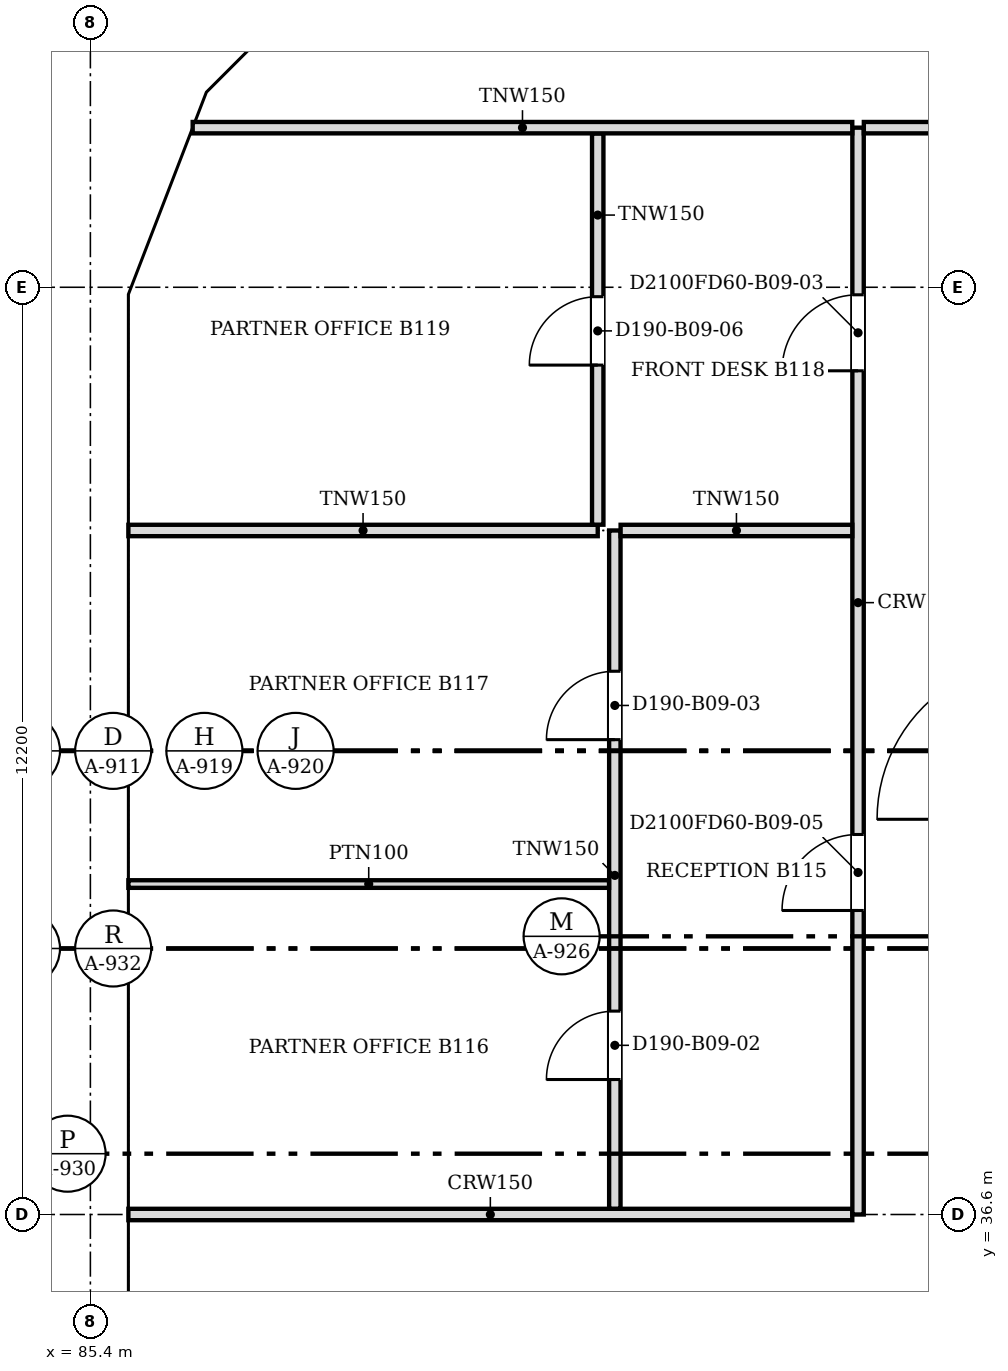
"""IFC4 building model, lengths in metres.
Left out: names, types, materials, properties, quantities, classifications, styles, units other than length and angle.
Written with IfcOpenShell. Run it as: python <this file> out.ifc"""

import sys

from ifc_helpers import new_model, si_unit, direction, frame, frame_2d, origin, place, context, subcontext, project, spatial, polyline, rectangle, outline, extrude, faceted_brep, source, transform, mapped, element, fill, save


model = new_model("IFC4")
c1 = context("Model", 3, precision=1e-05, world=origin(), true_north=direction((0.0, 1.0)))
c2 = subcontext(c1, "Body", "Model", "MODEL_VIEW")
j1 = project(units=[si_unit("LENGTHUNIT", "METRE"), si_unit("PLANEANGLEUNIT", "RADIAN")], contexts=[c1])
p1 = place(None, origin())
s1 = spatial("IfcSite", under=j1, at=p1, CompositionType="ELEMENT")
p2 = place(p1, origin())
s2 = spatial("IfcBuilding", under=s1, at=p2, CompositionType="ELEMENT")
p3 = place(p2, frame((0.0, 0.0, 91.4)))
s3 = spatial("IfcBuildingStorey", under=s2, at=p3, CompositionType="ELEMENT", Elevation=91.4)
m1 = source(origin(), c2, "Body", "Brep", [
    faceted_brep([(2.944, -0.25, 0.0), (2.997, -0.25, 0.068), (2.997, -0.25, 7.532), (2.944, -0.25, 7.6), (0.0, -0.25, 3.8), (0.053, 0.25, 3.868), (2.891, 0.25, 7.532), (2.891, 0.25, 0.068), (0.053, 0.25, 3.731), (2.944, 0.0, 0.0), (2.944, 0.0, 7.6), (0.0, 0.0, 3.8)], [[[0, 1, 2, 3, 4]], [[5, 6, 7, 8]], [[1, 0, 9]], [[10, 3, 2]], [[6, 5, 11, 4, 3, 10]], [[8, 7, 9, 0, 4, 11]], [[8, 11, 5]], [[1, 9, 7, 6, 10, 2]]]),
])
p4 = place(p3, frame((88.794, 53.588, -3.8), z_axis=(0.0, 0.0, 1.0), x_axis=(-0.707066050402, -0.707147509625, 0.0)))
e1 = element("IfcWall", 1, at=p4, inside=s3, PredefinedType="SOLIDWALL", context=c2, shape_type="MappedRepresentation", body=[
    mapped(m1, transform((0.0, 0.0, 0.0), scale=1.0)),
])
m2 = source(origin(), c2, "Body", "SweptSolid", [
    extrude(outline(polyline([(2.744, 6.934), (0.316, 3.8), (2.744, 0.666), (2.744, 6.934)])), frame((0.0, 0.26, 0.0), z_axis=(0.0, -1.0, 0.0), x_axis=(1.0, 0.0, 0.0)), (0.0, 0.0, 1.0), 0.52),
])
p5 = place(p4, origin())
e2 = element("IfcOpeningElement", 2, at=p5, cuts=e1, PredefinedType="OPENING", context=c2, shape_type="MappedRepresentation", body=[
    mapped(m2, transform((0.0, 0.0, 0.0), scale=1.0)),
])
m3 = source(origin(), c2, "Body", "Brep", [
    faceted_brep([(0.053, -0.25, 0.0), (3.003, -0.25, 3.8), (0.053, -0.25, 7.6), (0.0, -0.25, 7.531), (0.0, -0.25, 0.068), (0.106, 0.25, 7.532), (2.957, 0.25, 3.86), (2.957, 0.25, 3.74), (0.106, 0.25, 0.068), (3.003, 0.0, 3.8), (0.053, 0.0, 0.0), (0.053, 0.0, 7.6)], [[[0, 1, 2, 3, 4]], [[5, 6, 7, 8]], [[8, 7, 9, 1, 0, 10]], [[6, 5, 11, 2, 1, 9]], [[3, 2, 11]], [[10, 0, 4]], [[8, 10, 4, 3, 11, 5]], [[9, 7, 6]]]),
])
p6 = place(p3, frame((86.731, 51.556, -3.8), z_axis=(0.0, 0.0, 1.0), x_axis=(-0.359855894603, -0.933007896601, 0.0)))
e3 = element("IfcWall", 3, at=p6, inside=s3, PredefinedType="SOLIDWALL", context=c2, shape_type="MappedRepresentation", body=[
    mapped(m3, transform((0.0, 0.0, 0.0), scale=1.0)),
])
m4 = source(origin(), c2, "Body", "SweptSolid", [
    extrude(outline(polyline([(0.253, 0.665), (2.687, 3.8), (0.253, 6.935), (0.253, 0.665)])), frame((0.0, 0.26, 0.0), z_axis=(0.0, -1.0, 0.0), x_axis=(1.0, 0.0, 0.0)), (0.0, 0.0, 1.0), 0.52),
])
p7 = place(p6, origin())
e4 = element("IfcOpeningElement", 4, at=p7, cuts=e3, PredefinedType="OPENING", context=c2, shape_type="MappedRepresentation", body=[
    mapped(m4, transform((0.0, 0.0, 0.0), scale=1.0)),
])
m5 = source(origin(), c2, "Body", "Brep", [
    faceted_brep([(3.003, -0.25, 0.0), (6.053, -0.25, 3.8), (3.003, -0.25, 7.6), (0.0, -0.25, 3.8), (0.047, 0.25, 3.859), (3.003, 0.25, 7.6), (6.053, 0.25, 3.8), (3.003, 0.25, 0.0), (0.047, 0.25, 3.741), (0.0, 0.0, 3.8)], [[[0, 1, 2, 3]], [[4, 5, 6, 7, 8]], [[7, 6, 1, 0]], [[6, 5, 2, 1]], [[5, 4, 9, 3, 2]], [[8, 7, 0, 3, 9]], [[8, 9, 4]]]),
])
p8 = place(p3, frame((85.65, 48.753, -3.8), z_axis=(0.0, 0.0, 1.0), x_axis=(0.0, -1.0, 0.0)))
e5 = element("IfcWall", 5, at=p8, inside=s3, PredefinedType="SOLIDWALL", context=c2, shape_type="MappedRepresentation", body=[
    mapped(m5, transform((0.0, 0.0, 0.0), scale=1.0)),
])
m6 = source(origin(), c2, "Body", "SweptSolid", [
    extrude(outline(polyline([(3.005, 0.401), (5.733, 3.8), (3.005, 7.199), (0.319, 3.8), (3.005, 0.401)])), frame((0.0, 0.26, 0.0), z_axis=(0.0, -1.0, 0.0), x_axis=(1.0, 0.0, 0.0)), (0.0, 0.0, 1.0), 0.52),
])
p9 = place(p8, origin())
e6 = element("IfcOpeningElement", 6, at=p9, cuts=e5, PredefinedType="OPENING", context=c2, shape_type="MappedRepresentation", body=[
    mapped(m6, transform((0.0, 0.0, 0.0), scale=1.0)),
])
m7 = source(origin(), c2, "Body", "Brep", [
    faceted_brep([(3.05, -0.25, 0.0), (6.1, -0.25, 3.8), (6.1, -0.25, 3.8), (3.05, -0.25, 7.6), (0.0, -0.25, 3.8), (0.0, 0.25, 3.8), (3.05, 0.25, 7.6), (6.1, 0.25, 3.8), (6.1, 0.25, 3.8), (3.05, 0.25, 0.0)], [[[0, 1, 2, 3, 4]], [[5, 6, 7, 8, 9]], [[9, 8, 1, 0]], [[7, 6, 3, 2]], [[6, 5, 4, 3]], [[5, 9, 0, 4]], [[1, 8, 7, 2]]]),
])
p10 = place(p3, frame((85.65, 42.7, -3.8), z_axis=(0.0, 0.0, 1.0), x_axis=(0.0, -1.0, 0.0)))
e7 = element("IfcWall", 7, at=p10, inside=s3, PredefinedType="SOLIDWALL", context=c2, shape_type="MappedRepresentation", body=[
    mapped(m7, transform((0.0, 0.0, 0.0), scale=1.0)),
])
m8 = source(origin(), c2, "Body", "SweptSolid", [
    extrude(outline(polyline([(3.05, 0.399), (5.78, 3.8), (3.05, 7.2), (0.321, 3.8), (3.05, 0.399)])), frame((0.0, 0.26, 0.0), z_axis=(0.0, -1.0, 0.0), x_axis=(1.0, 0.0, 0.0)), (0.0, 0.0, 1.0), 0.52),
])
p11 = place(p10, origin())
e8 = element("IfcOpeningElement", 8, at=p11, cuts=e7, PredefinedType="OPENING", context=c2, shape_type="MappedRepresentation", body=[
    mapped(m8, transform((0.0, 0.0, 0.0), scale=1.0)),
])
m9 = source(origin(), c2, "Body", "SweptSolid", [
    extrude(outline(polyline([(3.05, 0.0), (6.1, 3.8), (3.05, 7.6), (0.0, 3.8), (3.05, 0.0)])), frame((0.0, 0.25, 0.0), z_axis=(0.0, -1.0, 0.0), x_axis=(1.0, 0.0, 0.0)), (0.0, 0.0, 1.0), 0.5),
])
p12 = place(p3, frame((85.65, 36.6, -3.8), z_axis=(0.0, 0.0, 1.0), x_axis=(0.0, -1.0, 0.0)))
e9 = element("IfcWall", 9, at=p12, inside=s3, PredefinedType="SOLIDWALL", context=c2, shape_type="MappedRepresentation", body=[
    mapped(m9, transform((0.0, 0.0, 0.0), scale=1.0)),
])
p13 = place(p12, origin())
e10 = element("IfcOpeningElement", 10, at=p13, cuts=e9, PredefinedType="OPENING", context=c2, shape_type="MappedRepresentation", body=[
    mapped(m8, transform((0.0, 0.0, 0.0), scale=1.0)),
])
m10 = source(origin(), c2, "Body", "Brep", [
    faceted_brep([(0.053, -0.25, 0.0), (2.997, -0.25, 3.8), (0.0, -0.25, 3.8), (0.0, -0.25, 0.068), (0.106, 0.25, 3.8), (2.944, 0.25, 3.8), (2.944, 0.25, 3.732), (0.106, 0.25, 0.068), (2.997, 0.0, 3.8), (0.053, 0.0, 0.0)], [[[0, 1, 2, 3]], [[4, 5, 6, 7]], [[7, 6, 8, 1, 0, 9]], [[5, 4, 2, 1, 8]], [[9, 0, 3]], [[7, 9, 3, 2, 4]], [[6, 5, 8]]]),
])
p14 = place(p3, frame((88.831, 53.625, 0.0), z_axis=(0.0, 0.0, 1.0), x_axis=(-0.707147509625, -0.707066050402, 0.0)))
e11 = element("IfcWall", 11, at=p14, inside=s3, PredefinedType="SOLIDWALL", context=c2, shape_type="MappedRepresentation", body=[
    mapped(m10, transform((0.0, 0.0, 0.0), scale=1.0)),
])
m11 = source(origin(), c2, "Body", "SweptSolid", [
    extrude(outline(polyline([(0.253, 0.667), (2.487, 3.55), (0.253, 3.55), (0.253, 0.667)])), frame((0.0, 0.26, 0.0), z_axis=(0.0, -1.0, 0.0), x_axis=(1.0, 0.0, 0.0)), (0.0, 0.0, 1.0), 0.52),
])
p15 = place(p14, origin())
e12 = element("IfcOpeningElement", 12, at=p15, cuts=e11, PredefinedType="OPENING", context=c2, shape_type="MappedRepresentation", body=[
    mapped(m11, transform((0.0, 0.0, 0.0), scale=1.0)),
])
m12 = source(origin(), c2, "Body", "Brep", [
    faceted_brep([(2.95, -0.25, 0.0), (2.997, -0.25, 0.059), (2.997, -0.25, 3.8), (0.0, -0.25, 3.8), (0.053, 0.25, 3.8), (2.904, 0.25, 3.8), (2.904, 0.25, 0.06), (0.053, 0.25, 3.732), (2.95, 0.0, 0.0), (0.0, 0.0, 3.8)], [[[0, 1, 2, 3]], [[4, 5, 6, 7]], [[1, 0, 8]], [[5, 4, 9, 3, 2]], [[7, 6, 8, 0, 3, 9]], [[7, 9, 4]], [[1, 8, 6, 5, 2]]]),
])
p16 = place(p3, frame((86.712, 51.506, 0.0), z_axis=(0.0, 0.0, 1.0), x_axis=(-0.359874094142, -0.933000876937, 0.0)))
e13 = element("IfcWall", 13, at=p16, inside=s3, PredefinedType="SOLIDWALL", context=c2, shape_type="MappedRepresentation", body=[
    mapped(m12, transform((0.0, 0.0, 0.0), scale=1.0)),
])
m13 = source(origin(), c2, "Body", "SweptSolid", [
    extrude(outline(polyline([(2.75, 3.55), (0.511, 3.55), (2.75, 0.665), (2.75, 3.55)])), frame((0.0, 0.26, 0.0), z_axis=(0.0, -1.0, 0.0), x_axis=(1.0, 0.0, 0.0)), (0.0, 0.0, 1.0), 0.52),
])
p17 = place(p16, origin())
e14 = element("IfcOpeningElement", 14, at=p17, cuts=e13, PredefinedType="OPENING", context=c2, shape_type="MappedRepresentation", body=[
    mapped(m13, transform((0.0, 0.0, 0.0), scale=1.0)),
])
m14 = source(origin(), c2, "Body", "Brep", [
    faceted_brep([(0.047, -0.25, 0.0), (3.05, -0.25, 3.8), (0.0, -0.25, 3.8), (0.0, -0.25, 0.06), (0.093, 0.25, 3.8), (3.05, 0.25, 3.8), (0.093, 0.25, 0.059), (0.047, 0.0, 0.0)], [[[0, 1, 2, 3]], [[4, 5, 6]], [[6, 5, 1, 0, 7]], [[5, 4, 2, 1]], [[7, 0, 3]], [[6, 7, 3, 2, 4]]]),
])
p18 = place(p3, frame((85.65, 48.8, 0.0), z_axis=(0.0, 0.0, 1.0), x_axis=(0.0, -1.0, 0.0)))
e15 = element("IfcWall", 15, at=p18, inside=s3, PredefinedType="SOLIDWALL", context=c2, shape_type="MappedRepresentation", body=[
    mapped(m14, transform((0.0, 0.0, 0.0), scale=1.0)),
])
m15 = source(origin(), c2, "Body", "SweptSolid", [
    extrude(outline(polyline([(0.247, 0.656), (2.534, 3.55), (0.247, 3.55), (0.247, 0.656)])), frame((0.0, 0.26, 0.0), z_axis=(0.0, -1.0, 0.0), x_axis=(1.0, 0.0, 0.0)), (0.0, 0.0, 1.0), 0.52),
])
p19 = place(p18, origin())
e16 = element("IfcOpeningElement", 16, at=p19, cuts=e15, PredefinedType="OPENING", context=c2, shape_type="MappedRepresentation", body=[
    mapped(m15, transform((0.0, 0.0, 0.0), scale=1.0)),
])
m16 = source(origin(), c2, "Body", "SweptSolid", [
    extrude(outline(polyline([(3.05, 0.0), (6.1, 3.8), (0.0, 3.8), (3.05, 0.0)])), frame((0.0, 0.25, 0.0), z_axis=(0.0, -1.0, 0.0), x_axis=(1.0, 0.0, 0.0)), (0.0, 0.0, 1.0), 0.5),
])
p20 = place(p3, frame((85.65, 45.75, 0.0), z_axis=(0.0, 0.0, 1.0), x_axis=(0.0, -1.0, 0.0)))
e17 = element("IfcWall", 17, at=p20, inside=s3, PredefinedType="SOLIDWALL", context=c2, shape_type="MappedRepresentation", body=[
    mapped(m16, transform((0.0, 0.0, 0.0), scale=1.0)),
])
m17 = source(origin(), c2, "Body", "SweptSolid", [
    extrude(outline(polyline([(3.05, 0.399), (5.579, 3.55), (0.521, 3.55), (3.05, 0.399)])), frame((0.0, 0.26, 0.0), z_axis=(0.0, -1.0, 0.0), x_axis=(1.0, 0.0, 0.0)), (0.0, 0.0, 1.0), 0.52),
])
p21 = place(p20, origin())
e18 = element("IfcOpeningElement", 18, at=p21, cuts=e17, PredefinedType="OPENING", context=c2, shape_type="MappedRepresentation", body=[
    mapped(m17, transform((0.0, 0.0, 0.0), scale=1.0)),
])
m18 = source(origin(), c2, "Body", "Brep", [
    faceted_brep([(3.05, -0.25, 0.0), (6.1, -0.25, 3.8), (6.1, -0.25, 3.8), (0.0, -0.25, 3.8), (0.0, 0.25, 3.8), (6.1, 0.25, 3.8), (6.1, 0.25, 3.8), (3.05, 0.25, 0.0)], [[[0, 1, 2, 3]], [[4, 5, 6, 7]], [[7, 6, 1, 0]], [[5, 4, 3, 2]], [[4, 7, 0, 3]], [[1, 6, 5, 2]]]),
])
p22 = place(p3, frame((85.65, 39.65, 0.0), z_axis=(0.0, 0.0, 1.0), x_axis=(0.0, -1.0, 0.0)))
e19 = element("IfcWall", 19, at=p22, inside=s3, PredefinedType="SOLIDWALL", context=c2, shape_type="MappedRepresentation", body=[
    mapped(m18, transform((0.0, 0.0, 0.0), scale=1.0)),
])
p23 = place(p22, origin())
e20 = element("IfcOpeningElement", 20, at=p23, cuts=e19, PredefinedType="OPENING", context=c2, shape_type="MappedRepresentation", body=[
    mapped(m17, transform((0.0, 0.0, 0.0), scale=1.0)),
])
p24 = place(p3, frame((85.9, 36.6, 0.0), z_axis=(0.0, 0.0, 1.0), x_axis=(1.0, 0.0, 0.0)))
e21 = element("IfcWall", 21, at=p24, inside=s3, PredefinedType="PARTITIONING", context=c2, shape_type="SweptSolid", body=[
    extrude(rectangle(XDim=9.524, YDim=0.15, at=frame_2d((4.762, 0.0))), origin(), (0.0, 0.0, 1.0), 2.895),
])
p25 = place(p3, frame((95.5, 36.6, 0.0), z_axis=(0.0, 0.0, 1.0), x_axis=(0.0, 1.0, 0.0)))
e22 = element("IfcWall", 22, at=p25, inside=s3, PredefinedType="PARTITIONING", context=c2, shape_type="SweptSolid", body=[
    extrude(rectangle(XDim=14.3, YDim=0.15, at=frame_2d((7.15, 0.0))), origin(), (0.0, 0.0, 1.0), 2.895),
])
m19 = source(origin(), c2, "Body", "SweptSolid", [
    extrude(rectangle(XDim=1.0, YDim=2.1, at=frame_2d((0.5, 1.05))), frame((0.0, 0.085, 0.0), z_axis=(0.0, -1.0, 0.0), x_axis=(1.0, 0.0, 0.0)), (0.0, 0.0, 1.0), 0.17),
])
p26 = place(p25, frame((11.101, 0.0, 0.0)))
e23 = element("IfcOpeningElement", 23, at=p26, cuts=e22, PredefinedType="OPENING", context=c2, shape_type="MappedRepresentation", body=[
    mapped(m19, transform((0.0, 0.0, 0.0), scale=1.0)),
])
p27 = place(p25, frame((4.0, 0.0, 0.0)))
e24 = element("IfcOpeningElement", 24, at=p27, cuts=e22, PredefinedType="OPENING", context=c2, shape_type="MappedRepresentation", body=[
    mapped(m19, transform((0.0, 0.0, 0.0), scale=1.0)),
])
p28 = place(p3, frame((92.3, 36.676, 0.0), z_axis=(0.0, 0.0, 1.0), x_axis=(0.0, 1.0, 0.0)))
e25 = element("IfcWall", 25, at=p28, inside=s3, PredefinedType="PARTITIONING", context=c2, shape_type="SweptSolid", body=[
    extrude(rectangle(XDim=8.924, YDim=0.15, at=frame_2d((4.462, 0.0))), origin(), (0.0, 0.0, 1.0), 2.895),
])
m20 = source(origin(), c2, "Body", "SweptSolid", [
    extrude(rectangle(XDim=0.9, YDim=2.1, at=frame_2d((0.45, 1.05))), frame((0.0, 0.085, 0.0), z_axis=(0.0, -1.0, 0.0), x_axis=(1.0, 0.0, 0.0)), (0.0, 0.0, 1.0), 0.17),
])
p29 = place(p28, frame((1.7, 0.0, 0.0)))
e26 = element("IfcOpeningElement", 26, at=p29, cuts=e25, PredefinedType="OPENING", context=c2, shape_type="MappedRepresentation", body=[
    mapped(m20, transform((0.0, 0.0, 0.0), scale=1.0)),
])
p30 = place(p28, frame((6.172, 0.0, 0.0)))
e27 = element("IfcOpeningElement", 27, at=p30, cuts=e25, PredefinedType="OPENING", context=c2, shape_type="MappedRepresentation", body=[
    mapped(m20, transform((0.0, 0.0, 0.0), scale=1.0)),
])
p31 = place(p3, frame((85.9, 40.948, 0.0), z_axis=(0.0, 0.0, 1.0), x_axis=(1.0, 0.0, 0.0)))
e28 = element("IfcWall", 28, at=p31, inside=s3, PredefinedType="PARTITIONING", context=c2, shape_type="SweptSolid", body=[
    extrude(rectangle(XDim=6.324, YDim=0.1, at=frame_2d((3.162, 0.0))), origin(), (0.0, 0.0, 1.0), 2.895),
])
p32 = place(p3, frame((85.9, 45.6, 0.0), z_axis=(0.0, 0.0, 1.0), x_axis=(1.0, 0.0, 0.0)))
e29 = element("IfcWall", 29, at=p32, inside=s3, PredefinedType="PARTITIONING", context=c2, shape_type="SweptSolid", body=[
    extrude(rectangle(XDim=6.175, YDim=0.15, at=frame_2d((3.087, 0.0))), origin(), (0.0, 0.0, 1.0), 2.895),
])
p33 = place(p3, frame((92.376, 45.6, 0.0), z_axis=(0.0, 0.0, 1.0), x_axis=(1.0, 0.0, 0.0)))
e30 = element("IfcWall", 30, at=p33, inside=s3, PredefinedType="PARTITIONING", context=c2, shape_type="SweptSolid", body=[
    extrude(rectangle(XDim=3.048, YDim=0.15, at=frame_2d((1.524, 0.0))), origin(), (0.0, 0.0, 1.0), 2.895),
])
p34 = place(p3, frame((92.075, 45.676, 0.0), z_axis=(0.0, 0.0, 1.0), x_axis=(0.0, 1.0, 0.0)))
e31 = element("IfcWall", 31, at=p34, inside=s3, PredefinedType="PARTITIONING", context=c2, shape_type="SweptSolid", body=[
    extrude(rectangle(XDim=5.148, YDim=0.15, at=frame_2d((2.574, 0.0))), origin(), (0.0, 0.0, 1.0), 2.895),
])
p35 = place(p34, frame((2.1, 0.0, 0.0)))
e32 = element("IfcOpeningElement", 32, at=p35, cuts=e31, PredefinedType="OPENING", context=c2, shape_type="MappedRepresentation", body=[
    mapped(m20, transform((0.0, 0.0, 0.0), scale=1.0)),
])
p36 = place(p3, frame((86.746, 50.9, 0.0), z_axis=(0.0, 0.0, 1.0), x_axis=(1.0, 0.0, 0.0)))
e33 = element("IfcWall", 33, at=p36, inside=s3, PredefinedType="PARTITIONING", context=c2, shape_type="SweptSolid", body=[
    extrude(rectangle(XDim=8.678, YDim=0.15, at=frame_2d((4.339, 0.0))), origin(), (0.0, 0.0, 1.0), 2.895),
])
p37 = place(p3, frame((95.576, 50.9, 0.0), z_axis=(0.0, 0.0, 1.0), x_axis=(1.0, 0.0, 0.0)))
e34 = element("IfcWall", 34, at=p37, inside=s3, PredefinedType="PARTITIONING", context=c2, shape_type="SweptSolid", body=[
    extrude(rectangle(XDim=4.424, YDim=0.15, at=frame_2d((2.212, 0.0))), origin(), (0.0, 0.0, 1.0), 2.895),
])
p38 = place(p37, frame((1.7, 0.0, 0.0)))
e35 = element("IfcOpeningElement", 35, at=p38, cuts=e34, PredefinedType="OPENING", context=c2, shape_type="MappedRepresentation", body=[
    mapped(m19, transform((0.0, 0.0, 0.0), scale=1.0)),
])
m21 = source(origin(), c2, "Body", "SweptSolid", [
    extrude(rectangle(XDim=0.9, YDim=2.1, at=frame_2d((0.45, 1.05))), frame((0.0, 0.025, 0.0), z_axis=(0.0, -1.0, 0.0), x_axis=(1.0, 0.0, 0.0)), (0.0, 0.0, 1.0), 0.05),
])
p39 = place(p29, origin())
e36 = element("IfcDoor", 36, at=p39, inside=s3, OperationType="SINGLE_SWING_LEFT", PredefinedType="DOOR", context=c2, shape_type="MappedRepresentation", body=[
    mapped(m21, transform((0.0, 0.0, 0.0), scale=1.0)),
])
fill(e26, e36)
p40 = place(p30, origin())
e37 = element("IfcDoor", 37, at=p40, inside=s3, OperationType="SINGLE_SWING_LEFT", PredefinedType="DOOR", context=c2, shape_type="MappedRepresentation", body=[
    mapped(m21, transform((0.0, 0.0, 0.0), scale=1.0)),
])
fill(e27, e37)
p41 = place(p35, origin())
e38 = element("IfcDoor", 38, at=p41, inside=s3, OperationType="SINGLE_SWING_LEFT", PredefinedType="DOOR", context=c2, shape_type="MappedRepresentation", body=[
    mapped(m21, transform((0.0, 0.0, 0.0), scale=1.0)),
])
fill(e32, e38)
m22 = source(origin(), c2, "Body", "SweptSolid", [
    extrude(rectangle(XDim=1.0, YDim=2.1, at=frame_2d((0.5, 1.05))), frame((0.0, 0.025, 0.0), z_axis=(0.0, -1.0, 0.0), x_axis=(1.0, 0.0, 0.0)), (0.0, 0.0, 1.0), 0.05),
])
p42 = place(p26, origin())
e39 = element("IfcDoor", 39, at=p42, inside=s3, OperationType="SINGLE_SWING_LEFT", PredefinedType="DOOR", context=c2, shape_type="MappedRepresentation", body=[
    mapped(m22, transform((0.0, 0.0, 0.0), scale=1.0)),
])
fill(e23, e39)
p43 = place(p27, origin())
e40 = element("IfcDoor", 40, at=p43, inside=s3, OperationType="SINGLE_SWING_LEFT", PredefinedType="DOOR", context=c2, shape_type="MappedRepresentation", body=[
    mapped(m22, transform((0.0, 0.0, 0.0), scale=1.0)),
])
fill(e24, e40)
save(model, sys.argv[1])
